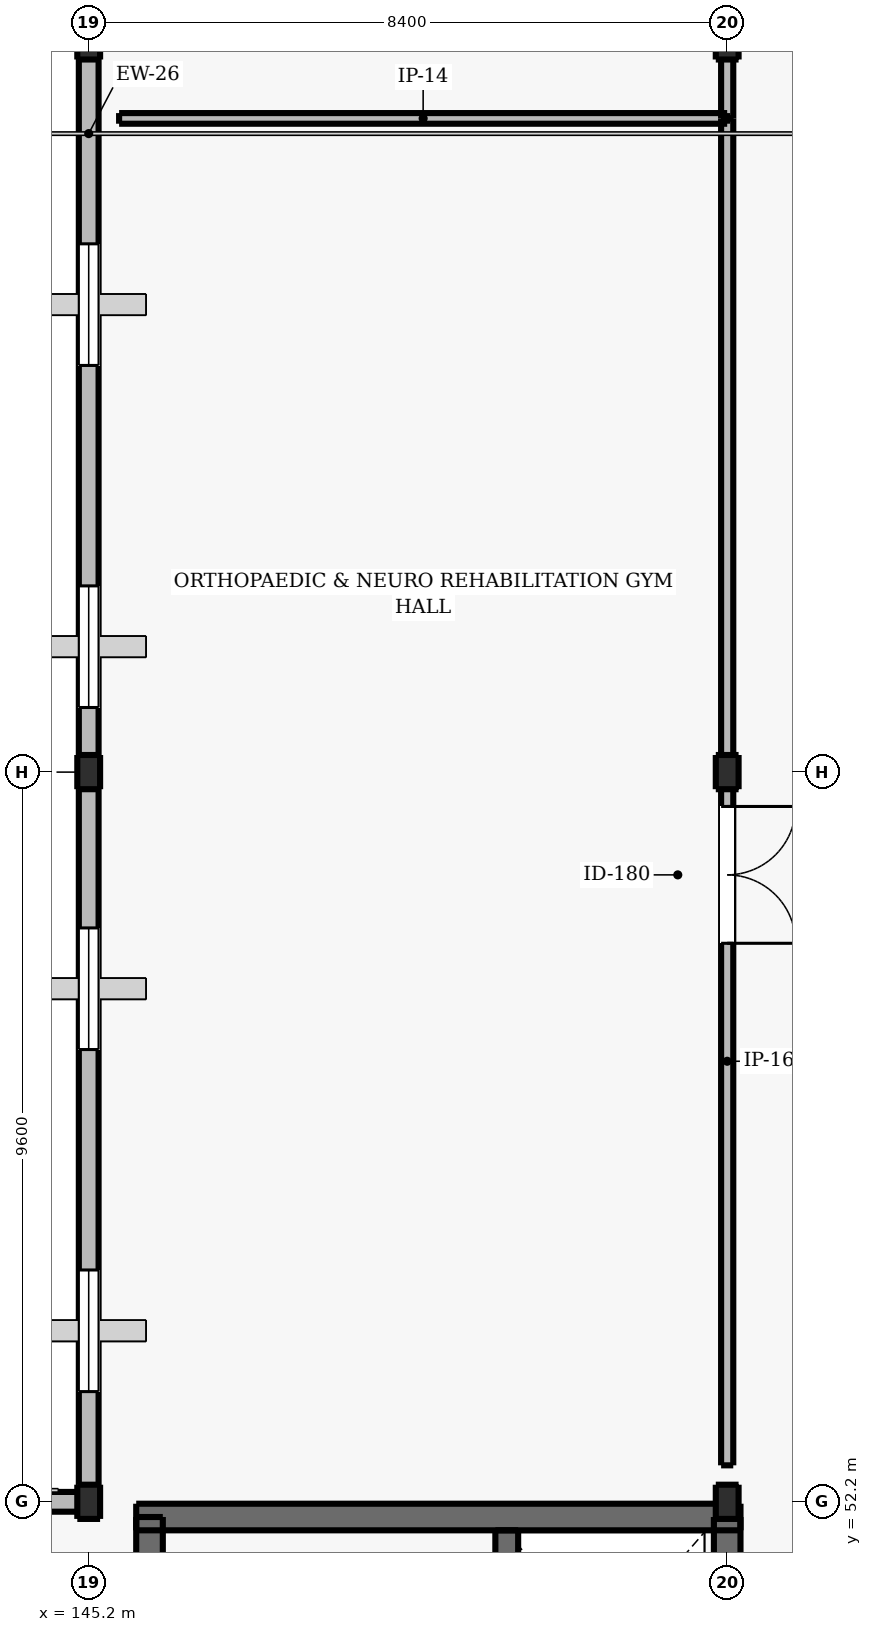
"""IFC4 building model, lengths in metres.
Left out: names, types, materials, properties, quantities, classifications, styles, units other than length and angle.
Written with IfcOpenShell. Run it as: python <this file> out.ifc"""

import sys

from ifc_helpers import new_model, si_unit, direction, frame, frame_2d, origin, origin_2d, place, context, subcontext, project, spatial, rectangle, i_section, extrude, element, fill, save


model = new_model("IFC4")
c1 = context("Model", 3, precision=1e-05, world=origin(), true_north=direction((0.0, 1.0)))
c2 = subcontext(c1, "Body", "Model", "MODEL_VIEW")
j1 = project(units=[si_unit("LENGTHUNIT", "METRE"), si_unit("PLANEANGLEUNIT", "RADIAN")], contexts=[c1])
p1 = place(None, origin())
s1 = spatial("IfcSite", under=j1, at=p1, CompositionType="ELEMENT")
p2 = place(p1, origin())
s2 = spatial("IfcBuilding", under=s1, at=p2, CompositionType="ELEMENT")
p3 = place(p2, frame((0.0, 0.0, 5.1)))
s3 = spatial("IfcBuildingStorey", under=s2, at=p3, CompositionType="ELEMENT", Elevation=5.1)
for number, where, z_axis, x_axis in (
    (1, (145.2, 52.2, 0.0), (0.0, 0.0, 1.0), (1.0, 0.0, 0.0)),
    (2, (145.2, 61.8, 0.0), (0.0, 0.0, 1.0), (1.0, 0.0, 0.0)),
    (3, (145.2, 71.4, 0.0), (0.0, 0.0, 1.0), (1.0, 0.0, 0.0)),
    (4, (153.6, 52.2, 0.0), (0.0, 0.0, 1.0), (1.0, 0.0, 0.0)),
    (5, (153.6, 61.8, 0.0), (0.0, 0.0, 1.0), (1.0, 0.0, 0.0)),
    (6, (153.6, 71.4, 0.0), (0.0, 0.0, 1.0), (1.0, 0.0, 0.0)),
):
    element("IfcColumn", number, at=place(p3, frame(where, z_axis=z_axis, x_axis=x_axis)), inside=s3, PredefinedType="COLUMN", context=c2, shape_type="SweptSolid", body=[
        extrude(i_section(OverallWidth=0.3, OverallDepth=0.45, WebThickness=0.014, FlangeThickness=0.026, FilletRadius=0.027, at=origin_2d()), origin(), (0.0, 0.0, 1.0), 4.5),
    ])
p4 = place(p3, frame((145.825, 52.0, 0.0), z_axis=(0.0, 0.0, 1.0), x_axis=(1.0, 0.0, 0.0)))
e7 = element("IfcWall", 7, at=p4, inside=s3, PredefinedType="SHEAR", context=c2, shape_type="SweptSolid", body=[
    extrude(rectangle(XDim=7.95, YDim=0.35, at=frame_2d((3.975, 0.0))), origin(), (0.0, 0.0, 1.0), 4.5),
])
for number, where, z_axis, x_axis in (
    (8, (146.0, 45.2, 0.0), (0.0, 0.0, 1.0), (0.0, 1.0, 0.0)),
    (9, (153.6, 45.2, 0.0), (0.0, 0.0, 1.0), (0.0, 1.0, 0.0)),
):
    element("IfcWall", number, at=place(p3, frame(where, z_axis=z_axis, x_axis=x_axis)), inside=s3, PredefinedType="SHEAR", context=c2, shape_type="SweptSolid", body=[
        extrude(rectangle(XDim=6.8, YDim=0.35, at=frame_2d((3.4, 0.0))), origin(), (0.0, 0.0, 1.0), 4.5),
    ])
p5 = place(p3, frame((150.7, 48.8, 0.0), z_axis=(0.0, 0.0, 1.0), x_axis=(0.0, 1.0, 0.0)))
e10 = element("IfcWall", 10, at=p5, inside=s3, PredefinedType="SHEAR", context=c2, shape_type="SweptSolid", body=[
    extrude(rectangle(XDim=3.025, YDim=0.3, at=frame_2d((1.512, 0.0))), origin(), (0.0, 0.0, 1.0), 4.5),
])
p6 = place(p5, frame((0.963, 0.0, 0.0)))
e11 = element("IfcOpeningElement", 11, at=p6, cuts=e10, PredefinedType="OPENING", context=c2, shape_type="SweptSolid", body=[
    extrude(rectangle(XDim=1.1, YDim=2.15, at=frame_2d((0.55, 1.075))), frame((0.0, 0.16, 0.0), z_axis=(0.0, -1.0, 0.0), x_axis=(1.0, 0.0, 0.0)), (0.0, 0.0, 1.0), 0.32),
])
p7 = place(p3, frame((111.0, 52.2, 0.0), z_axis=(0.0, 0.0, 1.0), x_axis=(1.0, 0.0, 0.0)))
e12 = element("IfcWall", 12, at=p7, inside=s3, PredefinedType="SOLIDWALL", context=c2, shape_type="SweptSolid", body=[
    extrude(rectangle(XDim=34.2, YDim=0.26, at=frame_2d((17.1, 0.0))), origin(), (0.0, 0.0, 1.0), 3.68),
])
p8 = place(p7, frame((1.243, 0.0, 0.95)))
e13 = element("IfcOpeningElement", 13, at=p8, cuts=e12, PredefinedType="OPENING", context=c2, shape_type="SweptSolid", body=[
    extrude(rectangle(XDim=2.4, YDim=1.75, at=frame_2d((1.2, 0.875))), frame((0.0, 0.14, 0.0), z_axis=(0.0, -1.0, 0.0), x_axis=(1.0, 0.0, 0.0)), (0.0, 0.0, 1.0), 0.28),
])
p9 = place(p7, frame((20.786, 0.0, 0.95)))
e14 = element("IfcOpeningElement", 14, at=p9, cuts=e12, PredefinedType="OPENING", context=c2, shape_type="SweptSolid", body=[
    extrude(rectangle(XDim=2.4, YDim=1.75, at=frame_2d((1.2, 0.875))), frame((0.0, 0.14, 0.0), z_axis=(0.0, -1.0, 0.0), x_axis=(1.0, 0.0, 0.0)), (0.0, 0.0, 1.0), 0.28),
])
p10 = place(p7, frame((30.557, 0.0, 0.95)))
e15 = element("IfcOpeningElement", 15, at=p10, cuts=e12, PredefinedType="OPENING", context=c2, shape_type="SweptSolid", body=[
    extrude(rectangle(XDim=2.4, YDim=1.75, at=frame_2d((1.2, 0.875))), frame((0.0, 0.14, 0.0), z_axis=(0.0, -1.0, 0.0), x_axis=(1.0, 0.0, 0.0)), (0.0, 0.0, 1.0), 0.28),
])
p11 = place(p3, frame((145.2, 52.2, 0.0), z_axis=(0.0, 0.0, 1.0), x_axis=(0.0, 1.0, 0.0)))
e16 = element("IfcWall", 16, at=p11, inside=s3, PredefinedType="SOLIDWALL", context=c2, shape_type="SweptSolid", body=[
    extrude(rectangle(XDim=36.0, YDim=0.26, at=frame_2d((18.0, 0.0))), origin(), (0.0, 0.0, 1.0), 3.72),
])
p12 = place(p11, frame((1.45, 0.0, 1.06)))
e17 = element("IfcOpeningElement", 17, at=p12, cuts=e16, PredefinedType="OPENING", context=c2, shape_type="SweptSolid", body=[
    extrude(rectangle(XDim=1.6, YDim=1.6, at=frame_2d((0.8, 0.8))), frame((0.0, 0.14, 0.0), z_axis=(0.0, -1.0, 0.0), x_axis=(1.0, 0.0, 0.0)), (0.0, 0.0, 1.0), 0.28),
])
p13 = place(p11, frame((5.95, 0.0, 1.06)))
e18 = element("IfcOpeningElement", 18, at=p13, cuts=e16, PredefinedType="OPENING", context=c2, shape_type="SweptSolid", body=[
    extrude(rectangle(XDim=1.6, YDim=1.6, at=frame_2d((0.8, 0.8))), frame((0.0, 0.14, 0.0), z_axis=(0.0, -1.0, 0.0), x_axis=(1.0, 0.0, 0.0)), (0.0, 0.0, 1.0), 0.28),
])
p14 = place(p11, frame((10.45, 0.0, 1.06)))
e19 = element("IfcOpeningElement", 19, at=p14, cuts=e16, PredefinedType="OPENING", context=c2, shape_type="SweptSolid", body=[
    extrude(rectangle(XDim=1.6, YDim=1.6, at=frame_2d((0.8, 0.8))), frame((0.0, 0.14, 0.0), z_axis=(0.0, -1.0, 0.0), x_axis=(1.0, 0.0, 0.0)), (0.0, 0.0, 1.0), 0.28),
])
p15 = place(p11, frame((14.95, 0.0, 1.06)))
e20 = element("IfcOpeningElement", 20, at=p15, cuts=e16, PredefinedType="OPENING", context=c2, shape_type="SweptSolid", body=[
    extrude(rectangle(XDim=1.6, YDim=1.6, at=frame_2d((0.8, 0.8))), frame((0.0, 0.14, 0.0), z_axis=(0.0, -1.0, 0.0), x_axis=(1.0, 0.0, 0.0)), (0.0, 0.0, 1.0), 0.28),
])
p16 = place(p11, frame((23.95, 0.0, 1.06)))
e21 = element("IfcOpeningElement", 21, at=p16, cuts=e16, PredefinedType="OPENING", context=c2, shape_type="SweptSolid", body=[
    extrude(rectangle(XDim=1.6, YDim=1.6, at=frame_2d((0.8, 0.8))), frame((0.0, 0.14, 0.0), z_axis=(0.0, -1.0, 0.0), x_axis=(1.0, 0.0, 0.0)), (0.0, 0.0, 1.0), 0.28),
])
p17 = place(p11, frame((32.95, 0.0, 1.06)))
e22 = element("IfcOpeningElement", 22, at=p17, cuts=e16, PredefinedType="OPENING", context=c2, shape_type="SweptSolid", body=[
    extrude(rectangle(XDim=1.6, YDim=1.6, at=frame_2d((0.8, 0.8))), frame((0.0, 0.14, 0.0), z_axis=(0.0, -1.0, 0.0), x_axis=(1.0, 0.0, 0.0)), (0.0, 0.0, 1.0), 0.28),
])
p18 = place(p3, frame((153.6, 52.68, 0.0), z_axis=(0.0, 0.0, 1.0), x_axis=(0.0, 1.0, 0.0)))
e23 = element("IfcWall", 23, at=p18, inside=s3, PredefinedType="PARTITIONING", context=c2, shape_type="SweptSolid", body=[
    extrude(rectangle(XDim=17.72, YDim=0.16, at=frame_2d((8.86, 0.0))), origin(), (0.0, 0.0, 1.0), 3.72),
])
p19 = place(p18, frame((6.868, 0.0, 0.0)))
e24 = element("IfcOpeningElement", 24, at=p19, cuts=e23, PredefinedType="OPENING", context=c2, shape_type="SweptSolid", body=[
    extrude(rectangle(XDim=1.8, YDim=2.25, at=frame_2d((0.9, 1.125))), frame((0.0, 0.09, 0.0), z_axis=(0.0, -1.0, 0.0), x_axis=(1.0, 0.0, 0.0)), (0.0, 0.0, 1.0), 0.18),
])
p20 = place(p3, frame((145.6, 70.4, 0.0), z_axis=(0.0, 0.0, 1.0), x_axis=(1.0, 0.0, 0.0)))
e25 = element("IfcWall", 25, at=p20, inside=s3, PredefinedType="PARTITIONING", context=c2, shape_type="SweptSolid", body=[
    extrude(rectangle(XDim=8.0, YDim=0.14, at=frame_2d((4.0, 0.0))), origin(), (0.0, 0.0, 1.0), 4.21),
])
p21 = place(p3, frame((153.6, 70.4, 0.0), z_axis=(0.0, 0.0, 1.0), x_axis=(0.0, 1.0, 0.0)))
e26 = element("IfcWall", 26, at=p21, inside=s3, PredefinedType="PARTITIONING", context=c2, shape_type="SweptSolid", body=[
    extrude(rectangle(XDim=11.4, YDim=0.16, at=frame_2d((5.7, 0.0))), origin(), (0.0, 0.0, 1.0), 3.72),
])
p22 = place(p21, frame((5.1, 0.0, 0.0)))
e27 = element("IfcOpeningElement", 27, at=p22, cuts=e26, PredefinedType="OPENING", context=c2, shape_type="SweptSolid", body=[
    extrude(rectangle(XDim=1.2, YDim=2.2, at=frame_2d((0.6, 1.1))), frame((0.0, 0.09, 0.0), z_axis=(0.0, -1.0, 0.0), x_axis=(1.0, 0.0, 0.0)), (0.0, 0.0, 1.0), 0.18),
])
p23 = place(p12, origin())
e28 = element("IfcWindow", 28, at=p23, inside=s3, PartitioningType="SINGLE_PANEL", PredefinedType="WINDOW", context=c2, shape_type="SweptSolid", body=[
    extrude(rectangle(XDim=1.6, YDim=1.6, at=frame_2d((0.8, 0.8))), frame((0.0, 0.03, 0.0), z_axis=(0.0, -1.0, 0.0), x_axis=(1.0, 0.0, 0.0)), (0.0, 0.0, 1.0), 0.06),
])
fill(e17, e28)
p24 = place(p13, origin())
e29 = element("IfcWindow", 29, at=p24, inside=s3, PartitioningType="SINGLE_PANEL", PredefinedType="WINDOW", context=c2, shape_type="SweptSolid", body=[
    extrude(rectangle(XDim=1.6, YDim=1.6, at=frame_2d((0.8, 0.8))), frame((0.0, 0.03, 0.0), z_axis=(0.0, -1.0, 0.0), x_axis=(1.0, 0.0, 0.0)), (0.0, 0.0, 1.0), 0.06),
])
fill(e18, e29)
p25 = place(p14, origin())
e30 = element("IfcWindow", 30, at=p25, inside=s3, PartitioningType="SINGLE_PANEL", PredefinedType="WINDOW", context=c2, shape_type="SweptSolid", body=[
    extrude(rectangle(XDim=1.6, YDim=1.6, at=frame_2d((0.8, 0.8))), frame((0.0, 0.03, 0.0), z_axis=(0.0, -1.0, 0.0), x_axis=(1.0, 0.0, 0.0)), (0.0, 0.0, 1.0), 0.06),
])
fill(e19, e30)
p26 = place(p15, origin())
e31 = element("IfcWindow", 31, at=p26, inside=s3, PartitioningType="SINGLE_PANEL", PredefinedType="WINDOW", context=c2, shape_type="SweptSolid", body=[
    extrude(rectangle(XDim=1.6, YDim=1.6, at=frame_2d((0.8, 0.8))), frame((0.0, 0.03, 0.0), z_axis=(0.0, -1.0, 0.0), x_axis=(1.0, 0.0, 0.0)), (0.0, 0.0, 1.0), 0.06),
])
fill(e20, e31)
p27 = place(p19, frame((1.8, 0.0, 0.0), z_axis=(0.0, 0.0, 1.0), x_axis=(-1.0, 0.0, 0.0)))
e32 = element("IfcDoor", 32, at=p27, inside=s3, OperationType="DOUBLE_DOOR_SINGLE_SWING", PredefinedType="DOOR", context=c2, shape_type="SweptSolid", body=[
    extrude(rectangle(XDim=1.8, YDim=2.25, at=frame_2d((0.9, 1.125))), frame((0.0, 0.025, 0.0), z_axis=(0.0, -1.0, 0.0), x_axis=(1.0, 0.0, 0.0)), (0.0, 0.0, 1.0), 0.05),
])
fill(e24, e32)
save(model, sys.argv[1])
